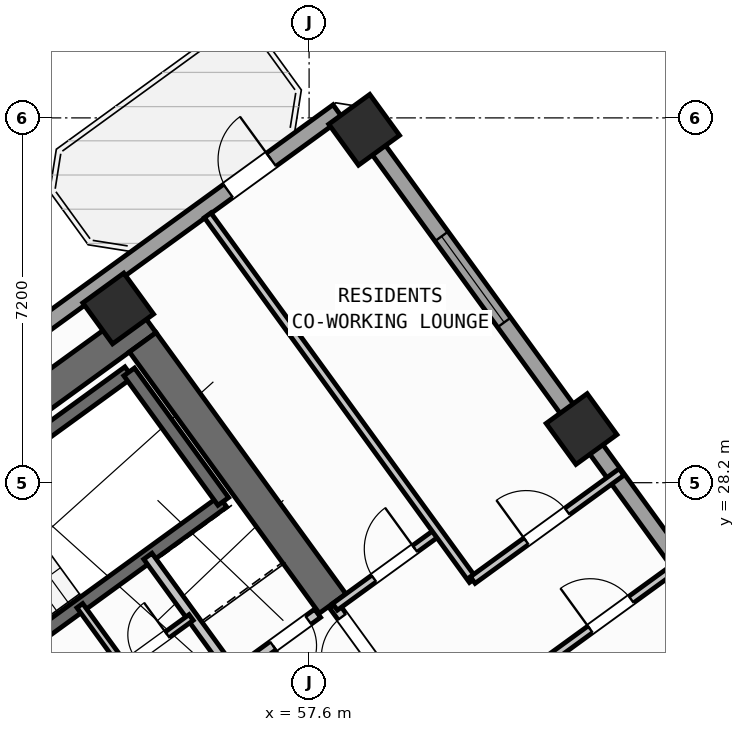
"""IFC4 building model, lengths in metres.
Left out: names, types, materials, properties, quantities, classifications, styles, units other than length and angle.
Written with IfcOpenShell. Run it as: python <this file> out.ifc"""

import sys

from ifc_helpers import new_model, si_unit, direction, frame, frame_2d, origin, origin_2d, place, context, subcontext, project, spatial, rectangle, hollow_rectangle, extrude, source, transform, mapped, element, fill, save


model = new_model("IFC4")
c1 = context("Model", 3, precision=1e-05, world=origin(), true_north=direction((0.0, 1.0)))
c2 = subcontext(c1, "Body", "Model", "MODEL_VIEW")
j1 = project(units=[si_unit("LENGTHUNIT", "METRE"), si_unit("PLANEANGLEUNIT", "RADIAN")], contexts=[c1])
p1 = place(None, origin())
s1 = spatial("IfcSite", under=j1, at=p1, CompositionType="ELEMENT")
p2 = place(p1, origin())
s2 = spatial("IfcBuilding", under=s1, at=p2, CompositionType="ELEMENT")
p3 = place(p2, frame((0.0, 0.0, 63.6)))
s3 = spatial("IfcBuildingStorey", under=s2, at=p3, CompositionType="ELEMENT", Elevation=63.6)
p4 = place(p3, frame((44.325, 24.113, 0.0), z_axis=(0.0, 0.0, 1.0), x_axis=(0.809012664862, 0.58779121131, 0.0)))
e1 = element("IfcWall", 1, at=p4, inside=s3, PredefinedType="SHEAR", context=c2, shape_type="SweptSolid", body=[
    extrude(rectangle(XDim=12.44, YDim=0.65, at=frame_2d((6.22, 0.0))), origin(), (0.0, 0.0, 1.0), 3.35),
])
p5 = place(p3, frame((58.064, 25.813, 0.0), z_axis=(0.0, 0.0, 1.0), x_axis=(-0.58777996584, 0.809020835181, 0.0)))
e2 = element("IfcWall", 2, at=p5, inside=s3, PredefinedType="SHEAR", context=c2, shape_type="SweptSolid", body=[
    extrude(rectangle(XDim=6.375, YDim=0.65, at=frame_2d((3.188, 0.0))), origin(), (0.0, 0.0, 1.0), 3.35),
])
m1 = source(origin(), c2, "Body", "SweptSolid", [
    extrude(hollow_rectangle(XDim=1.0, YDim=1.0, WallThickness=0.04, at=origin_2d()), origin(), (0.0, 0.0, 1.0), 3.6),
])
for number, where, z_axis, x_axis in (
    (3, (53.832, 31.638, 0.0), (0.0, 0.0, 1.0), (0.809, 0.588, 0.0)),
    (4, (62.977, 29.259, 0.0), (0.0, 0.0, 1.0), (0.809, 0.588, 0.0)),
    (5, (58.686, 35.165, 0.0), (0.0, 0.0, 1.0), (0.809, 0.588, 0.0)),
):
    element("IfcColumn", number, at=place(p3, frame(where, z_axis=z_axis, x_axis=x_axis)), inside=s3, PredefinedType="COLUMN", context=c2, shape_type="MappedRepresentation", body=[
        mapped(m1, transform((0.0, 0.0, 0.0), scale=1.0)),
    ])
p6 = place(p3, frame((43.938, 25.192, 0.0), z_axis=(0.0, 0.0, 1.0), x_axis=(0.809016324578, 0.587786174187, 0.0)))
e6 = element("IfcWall", 6, at=p6, inside=s3, PredefinedType="STANDARD", context=c2, shape_type="SweptSolid", body=[
    extrude(rectangle(XDim=17.587, YDim=0.32, at=frame_2d((8.794, 0.0))), origin(), (0.0, 0.0, 1.0), 3.35),
])
p7 = place(p6, frame((14.914, 0.0, 0.0)))
e7 = element("IfcOpeningElement", 7, at=p7, cuts=e6, PredefinedType="OPENING", context=c2, shape_type="SweptSolid", body=[
    extrude(rectangle(XDim=1.05, YDim=2.15, at=frame_2d((0.525, 1.075))), frame((0.0, 0.17, 0.0), z_axis=(0.0, -1.0, 0.0), x_axis=(1.0, 0.0, 0.0)), (0.0, 0.0, 1.0), 0.34),
])
p8 = place(p6, frame((2.169, 0.0, 0.8)))
e8 = element("IfcOpeningElement", 8, at=p8, cuts=e6, PredefinedType="OPENING", context=c2, shape_type="SweptSolid", body=[
    extrude(rectangle(XDim=2.1, YDim=1.55, at=frame_2d((1.05, 0.775))), frame((0.0, 0.17, 0.0), z_axis=(0.0, -1.0, 0.0), x_axis=(1.0, 0.0, 0.0)), (0.0, 0.0, 1.0), 0.34),
])
p9 = place(p6, frame((7.319, 0.0, 0.8)))
e9 = element("IfcOpeningElement", 9, at=p9, cuts=e6, PredefinedType="OPENING", context=c2, shape_type="SweptSolid", body=[
    extrude(rectangle(XDim=2.1, YDim=1.55, at=frame_2d((1.05, 0.775))), frame((0.0, 0.17, 0.0), z_axis=(0.0, -1.0, 0.0), x_axis=(1.0, 0.0, 0.0)), (0.0, 0.0, 1.0), 0.34),
])
p10 = place(p3, frame((58.455, 35.484, 0.0), z_axis=(0.0, 0.0, 1.0), x_axis=(0.587783625747, -0.809018176127, 0.0)))
e10 = element("IfcWall", 10, at=p10, inside=s3, PredefinedType="STANDARD", context=c2, shape_type="SweptSolid", body=[
    extrude(rectangle(XDim=21.587, YDim=0.32, at=frame_2d((10.794, 0.0))), origin(), (0.0, 0.0, 1.0), 2.725),
])
p11 = place(p10, frame((2.994, 0.0, 0.8)))
e11 = element("IfcOpeningElement", 11, at=p11, cuts=e10, PredefinedType="OPENING", context=c2, shape_type="SweptSolid", body=[
    extrude(rectangle(XDim=2.1, YDim=1.55, at=frame_2d((1.05, 0.775))), frame((0.0, 0.17, 0.0), z_axis=(0.0, -1.0, 0.0), x_axis=(1.0, 0.0, 0.0)), (0.0, 0.0, 1.0), 0.34),
])
p12 = place(p10, frame((11.934, 0.0, 0.85)))
e12 = element("IfcOpeningElement", 12, at=p12, cuts=e10, PredefinedType="OPENING", context=c2, shape_type="SweptSolid", body=[
    extrude(rectangle(XDim=1.8, YDim=1.5, at=frame_2d((0.9, 0.75))), frame((0.0, 0.17, 0.0), z_axis=(0.0, -1.0, 0.0), x_axis=(1.0, 0.0, 0.0)), (0.0, 0.0, 1.0), 0.34),
])
p13 = place(p10, frame((18.535, 0.0, 0.85)))
e13 = element("IfcOpeningElement", 13, at=p13, cuts=e10, PredefinedType="OPENING", context=c2, shape_type="SweptSolid", body=[
    extrude(rectangle(XDim=1.5, YDim=1.5, at=frame_2d((0.75, 0.75))), frame((0.0, 0.17, 0.0), z_axis=(0.0, -1.0, 0.0), x_axis=(1.0, 0.0, 0.0)), (0.0, 0.0, 1.0), 0.34),
])
p14 = place(p3, frame((48.006, 25.996, 0.0), z_axis=(0.0, 0.0, 1.0), x_axis=(0.80901903764, 0.587782439969, 0.0)))
e14 = element("IfcWall", 14, at=p14, inside=s3, PredefinedType="SHEAR", context=c2, shape_type="SweptSolid", body=[
    extrude(rectangle(XDim=7.46, YDim=0.26, at=frame_2d((3.73, 0.0))), origin(), (0.0, 0.0, 1.0), 3.35),
])
p15 = place(p3, frame((49.863, 23.44, 0.0), z_axis=(0.0, 0.0, 1.0), x_axis=(0.809003474932, 0.587803859759, 0.0)))
e15 = element("IfcWall", 15, at=p15, inside=s3, PredefinedType="SHEAR", context=c2, shape_type="SweptSolid", body=[
    extrude(rectangle(XDim=7.46, YDim=0.26, at=frame_2d((3.73, 0.0))), origin(), (0.0, 0.0, 1.0), 3.35),
])
p16 = place(p15, frame((0.36, 0.0, 0.0)))
e16 = element("IfcOpeningElement", 16, at=p16, cuts=e15, PredefinedType="OPENING", context=c2, shape_type="SweptSolid", body=[
    extrude(rectangle(XDim=0.86, YDim=2.05, at=frame_2d((0.43, 1.025))), frame((0.0, 0.14, 0.0), z_axis=(0.0, -1.0, 0.0), x_axis=(1.0, 0.0, 0.0)), (0.0, 0.0, 1.0), 0.28),
])
p17 = place(p3, frame((55.906, 27.831, 0.0), z_axis=(0.0, 0.0, 1.0), x_axis=(-0.587804123638, 0.809003283204, 0.0)))
e17 = element("IfcWall", 17, at=p17, inside=s3, PredefinedType="SHEAR", context=c2, shape_type="SweptSolid", body=[
    extrude(rectangle(XDim=3.16, YDim=0.26, at=frame_2d((1.58, 0.0))), origin(), (0.0, 0.0, 1.0), 3.35),
])
p18 = place(p3, frame((56.111, 24.419, 0.0), z_axis=(0.0, 0.0, 1.0), x_axis=(-0.58777848983, 0.809021907548, 0.0)))
e18 = element("IfcWall", 18, at=p18, inside=s3, PredefinedType="STANDARD", context=c2, shape_type="SweptSolid", body=[
    extrude(rectangle(XDim=2.88, YDim=0.2, at=frame_2d((1.44, 0.0))), origin(), (0.0, 0.0, 1.0), 3.34),
])
p19 = place(p3, frame((53.425, 22.468, 0.0), z_axis=(0.0, 0.0, 1.0), x_axis=(0.80902705128, 0.587771409902, 0.0)))
e19 = element("IfcWall", 19, at=p19, inside=s3, PredefinedType="STANDARD", context=c2, shape_type="SweptSolid", body=[
    extrude(rectangle(XDim=5.368, YDim=0.2, at=frame_2d((2.684, 0.0))), origin(), (0.0, 0.0, 1.0), 3.34),
])
p20 = place(p19, frame((4.28, 0.0, 0.0)))
e20 = element("IfcOpeningElement", 20, at=p20, cuts=e19, PredefinedType="OPENING", context=c2, shape_type="SweptSolid", body=[
    extrude(rectangle(XDim=0.86, YDim=2.05, at=frame_2d((0.43, 1.025))), frame((0.0, 0.11, 0.0), z_axis=(0.0, -1.0, 0.0), x_axis=(1.0, 0.0, 0.0)), (0.0, 0.0, 1.0), 0.22),
])
p21 = place(p19, frame((0.35, 0.0, 0.0)))
e21 = element("IfcOpeningElement", 21, at=p21, cuts=e19, PredefinedType="OPENING", context=c2, shape_type="SweptSolid", body=[
    extrude(rectangle(XDim=0.86, YDim=2.05, at=frame_2d((0.43, 1.025))), frame((0.0, 0.11, 0.0), z_axis=(0.0, -1.0, 0.0), x_axis=(1.0, 0.0, 0.0)), (0.0, 0.0, 1.0), 0.22),
])
p22 = place(p3, frame((53.945, 24.576, 0.0), z_axis=(0.0, 0.0, 1.0), x_axis=(-0.587897037186, 0.808935766095, 0.0)))
e22 = element("IfcWall", 22, at=p22, inside=s3, PredefinedType="PLUMBINGWALL", context=c2, shape_type="SweptSolid", body=[
    extrude(rectangle(XDim=1.48, YDim=0.14, at=frame_2d((0.74, 0.0))), origin(), (0.0, 0.0, 1.0), 3.34),
])
p23 = place(p3, frame((52.618, 23.612, 0.0), z_axis=(0.0, 0.0, 1.0), x_axis=(0.809009587469, 0.587795446889, 0.0)))
e23 = element("IfcWall", 23, at=p23, inside=s3, PredefinedType="PLUMBINGWALL", context=c2, shape_type="SweptSolid", body=[
    extrude(rectangle(XDim=3.28, YDim=0.14, at=frame_2d((1.64, 0.0))), origin(), (0.0, 0.0, 1.0), 3.34),
])
p24 = place(p23, frame((0.25, 0.0, 0.0)))
e24 = element("IfcOpeningElement", 24, at=p24, cuts=e23, PredefinedType="OPENING", context=c2, shape_type="SweptSolid", body=[
    extrude(rectangle(XDim=0.78, YDim=2.05, at=frame_2d((0.39, 1.025))), frame((0.0, 0.08, 0.0), z_axis=(0.0, -1.0, 0.0), x_axis=(1.0, 0.0, 0.0)), (0.0, 0.0, 1.0), 0.16),
])
p25 = place(p23, frame((1.92, 0.0, 0.0)))
e25 = element("IfcOpeningElement", 25, at=p25, cuts=e23, PredefinedType="OPENING", context=c2, shape_type="SweptSolid", body=[
    extrude(rectangle(XDim=0.78, YDim=2.05, at=frame_2d((0.39, 1.025))), frame((0.0, 0.08, 0.0), z_axis=(0.0, -1.0, 0.0), x_axis=(1.0, 0.0, 0.0)), (0.0, 0.0, 1.0), 0.16),
])
p26 = place(p3, frame((59.827, 23.386, 0.0), z_axis=(0.0, 0.0, 1.0), x_axis=(-0.587803840107, 0.809003489211, 0.0)))
e26 = element("IfcWall", 26, at=p26, inside=s3, PredefinedType="STANDARD", context=c2, shape_type="SweptSolid", body=[
    extrude(rectangle(XDim=2.96, YDim=0.2, at=frame_2d((1.48, 0.0))), origin(), (0.0, 0.0, 1.0), 3.34),
])
p27 = place(p26, frame((1.68, 0.0, 0.0)))
e27 = element("IfcOpeningElement", 27, at=p27, cuts=e26, PredefinedType="OPENING", context=c2, shape_type="SweptSolid", body=[
    extrude(rectangle(XDim=1.0, YDim=2.1, at=frame_2d((0.5, 1.05))), frame((0.0, 0.11, 0.0), z_axis=(0.0, -1.0, 0.0), x_axis=(1.0, 0.0, 0.0)), (0.0, 0.0, 1.0), 0.22),
])
p28 = place(p3, frame((58.111, 25.749, 0.0), z_axis=(0.0, 0.0, 1.0), x_axis=(0.809000999347, 0.58780726693, 0.0)))
e28 = element("IfcWall", 28, at=p28, inside=s3, PredefinedType="PARTITIONING", context=c2, shape_type="SweptSolid", body=[
    extrude(rectangle(XDim=2.51, YDim=0.16, at=frame_2d((1.255, 0.0))), origin(), (0.0, 0.0, 1.0), 2.725),
])
p29 = place(p28, frame((0.95, 0.0, 0.0)))
e29 = element("IfcOpeningElement", 29, at=p29, cuts=e28, PredefinedType="OPENING", context=c2, shape_type="SweptSolid", body=[
    extrude(rectangle(XDim=1.0, YDim=2.1, at=frame_2d((0.5, 1.05))), frame((0.0, 0.09, 0.0), z_axis=(0.0, -1.0, 0.0), x_axis=(1.0, 0.0, 0.0)), (0.0, 0.0, 1.0), 0.18),
])
p30 = place(p3, frame((60.829, 26.278, 0.0), z_axis=(0.0, 0.0, 1.0), x_axis=(-0.587781800813, 0.80901950201, 0.0)))
e30 = element("IfcWall", 30, at=p30, inside=s3, PredefinedType="PARTITIONING", context=c2, shape_type="SweptSolid", body=[
    extrude(rectangle(XDim=8.9, YDim=0.16, at=frame_2d((4.45, 0.0))), origin(), (0.0, 0.0, 1.0), 3.34),
])
p31 = place(p3, frame((62.093, 24.538, 0.0), z_axis=(0.0, 0.0, 1.0), x_axis=(0.809035546126, 0.58775971715, 0.0)))
e31 = element("IfcWall", 31, at=p31, inside=s3, PredefinedType="PARTITIONING", context=c2, shape_type="SweptSolid", body=[
    extrude(rectangle(XDim=3.63, YDim=0.16, at=frame_2d((1.815, 0.0))), origin(), (0.0, 0.0, 1.0), 3.34),
])
p32 = place(p31, frame((1.305, 0.0, 0.0)))
e32 = element("IfcOpeningElement", 32, at=p32, cuts=e31, PredefinedType="OPENING", context=c2, shape_type="SweptSolid", body=[
    extrude(rectangle(XDim=1.0, YDim=2.1, at=frame_2d((0.5, 1.05))), frame((0.0, 0.09, 0.0), z_axis=(0.0, -1.0, 0.0), x_axis=(1.0, 0.0, 0.0)), (0.0, 0.0, 1.0), 0.18),
])
p33 = place(p3, frame((60.829, 26.278, 0.0), z_axis=(0.0, 0.0, 1.0), x_axis=(0.809003564202, 0.587803736896, 0.0)))
e33 = element("IfcWall", 33, at=p33, inside=s3, PredefinedType="PARTITIONING", context=c2, shape_type="SweptSolid", body=[
    extrude(rectangle(XDim=3.63, YDim=0.16, at=frame_2d((1.815, 0.0))), origin(), (0.0, 0.0, 1.0), 3.34),
])
p34 = place(p33, frame((1.305, 0.0, 0.0)))
e34 = element("IfcOpeningElement", 34, at=p34, cuts=e33, PredefinedType="OPENING", context=c2, shape_type="SweptSolid", body=[
    extrude(rectangle(XDim=1.0, YDim=2.1, at=frame_2d((0.5, 1.05))), frame((0.0, 0.09, 0.0), z_axis=(0.0, -1.0, 0.0), x_axis=(1.0, 0.0, 0.0)), (0.0, 0.0, 1.0), 0.18),
])
m2 = source(origin(), c2, "Body", "SweptSolid", [
    extrude(rectangle(XDim=1.05, YDim=2.15, at=frame_2d((0.525, 1.075))), frame((0.0, 0.025, 0.0), z_axis=(0.0, -1.0, 0.0), x_axis=(1.0, 0.0, 0.0)), (0.0, 0.0, 1.0), 0.05),
])
p35 = place(p7, origin())
e35 = element("IfcDoor", 35, at=p35, inside=s3, OperationType="SINGLE_SWING_RIGHT", PredefinedType="DOOR", context=c2, shape_type="MappedRepresentation", body=[
    mapped(m2, transform((0.0, 0.0, 0.0), scale=1.0)),
])
fill(e7, e35)
m3 = source(origin(), c2, "Body", "SweptSolid", [
    extrude(rectangle(XDim=2.1, YDim=1.55, at=frame_2d((1.05, 0.775))), frame((0.0, 0.03, 0.0), z_axis=(0.0, -1.0, 0.0), x_axis=(1.0, 0.0, 0.0)), (0.0, 0.0, 1.0), 0.06),
])
p36 = place(p11, origin())
e36 = element("IfcWindow", 36, at=p36, inside=s3, PartitioningType="SINGLE_PANEL", PredefinedType="WINDOW", context=c2, shape_type="MappedRepresentation", body=[
    mapped(m3, transform((0.0, 0.0, 0.0), scale=1.0)),
])
fill(e11, e36)
m4 = source(origin(), c2, "Body", "SweptSolid", [
    extrude(rectangle(XDim=0.86, YDim=2.05, at=frame_2d((0.43, 1.025))), frame((0.0, 0.025, 0.0), z_axis=(0.0, -1.0, 0.0), x_axis=(1.0, 0.0, 0.0)), (0.0, 0.0, 1.0), 0.05),
])
p37 = place(p20, frame((0.86, 0.0, 0.0), z_axis=(0.0, 0.0, 1.0), x_axis=(-1.0, 0.0, 0.0)))
e37 = element("IfcDoor", 37, at=p37, inside=s3, OperationType="SINGLE_SWING_RIGHT", PredefinedType="DOOR", context=c2, shape_type="MappedRepresentation", body=[
    mapped(m4, transform((0.0, 0.0, 0.0), scale=1.0)),
])
fill(e20, e37)
m5 = source(origin(), c2, "Body", "SweptSolid", [
    extrude(rectangle(XDim=0.78, YDim=2.05, at=frame_2d((0.39, 1.025))), frame((0.0, 0.025, 0.0), z_axis=(0.0, -1.0, 0.0), x_axis=(1.0, 0.0, 0.0)), (0.0, 0.0, 1.0), 0.05),
])
p38 = place(p25, origin())
e38 = element("IfcDoor", 38, at=p38, inside=s3, OperationType="SINGLE_SWING_RIGHT", PredefinedType="DOOR", context=c2, shape_type="MappedRepresentation", body=[
    mapped(m5, transform((0.0, 0.0, 0.0), scale=1.0)),
])
fill(e25, e38)
m6 = source(origin(), c2, "Body", "SweptSolid", [
    extrude(rectangle(XDim=1.0, YDim=2.1, at=frame_2d((0.5, 1.05))), frame((0.0, 0.025, 0.0), z_axis=(0.0, -1.0, 0.0), x_axis=(1.0, 0.0, 0.0)), (0.0, 0.0, 1.0), 0.05),
])
p39 = place(p29, origin())
e39 = element("IfcDoor", 39, at=p39, inside=s3, OperationType="SINGLE_SWING_RIGHT", PredefinedType="DOOR", context=c2, shape_type="MappedRepresentation", body=[
    mapped(m6, transform((0.0, 0.0, 0.0), scale=1.0)),
])
fill(e29, e39)
p40 = place(p27, origin())
e40 = element("IfcDoor", 40, at=p40, inside=s3, OperationType="SINGLE_SWING_LEFT", PredefinedType="DOOR", context=c2, shape_type="MappedRepresentation", body=[
    mapped(m6, transform((0.0, 0.0, 0.0), scale=1.0)),
])
fill(e27, e40)
p41 = place(p34, origin())
e41 = element("IfcDoor", 41, at=p41, inside=s3, OperationType="SINGLE_SWING_LEFT", PredefinedType="DOOR", context=c2, shape_type="MappedRepresentation", body=[
    mapped(m6, transform((0.0, 0.0, 0.0), scale=1.0)),
])
fill(e34, e41)
p42 = place(p32, origin())
e42 = element("IfcDoor", 42, at=p42, inside=s3, OperationType="SINGLE_SWING_LEFT", PredefinedType="DOOR", context=c2, shape_type="MappedRepresentation", body=[
    mapped(m6, transform((0.0, 0.0, 0.0), scale=1.0)),
])
fill(e32, e42)
save(model, sys.argv[1])
